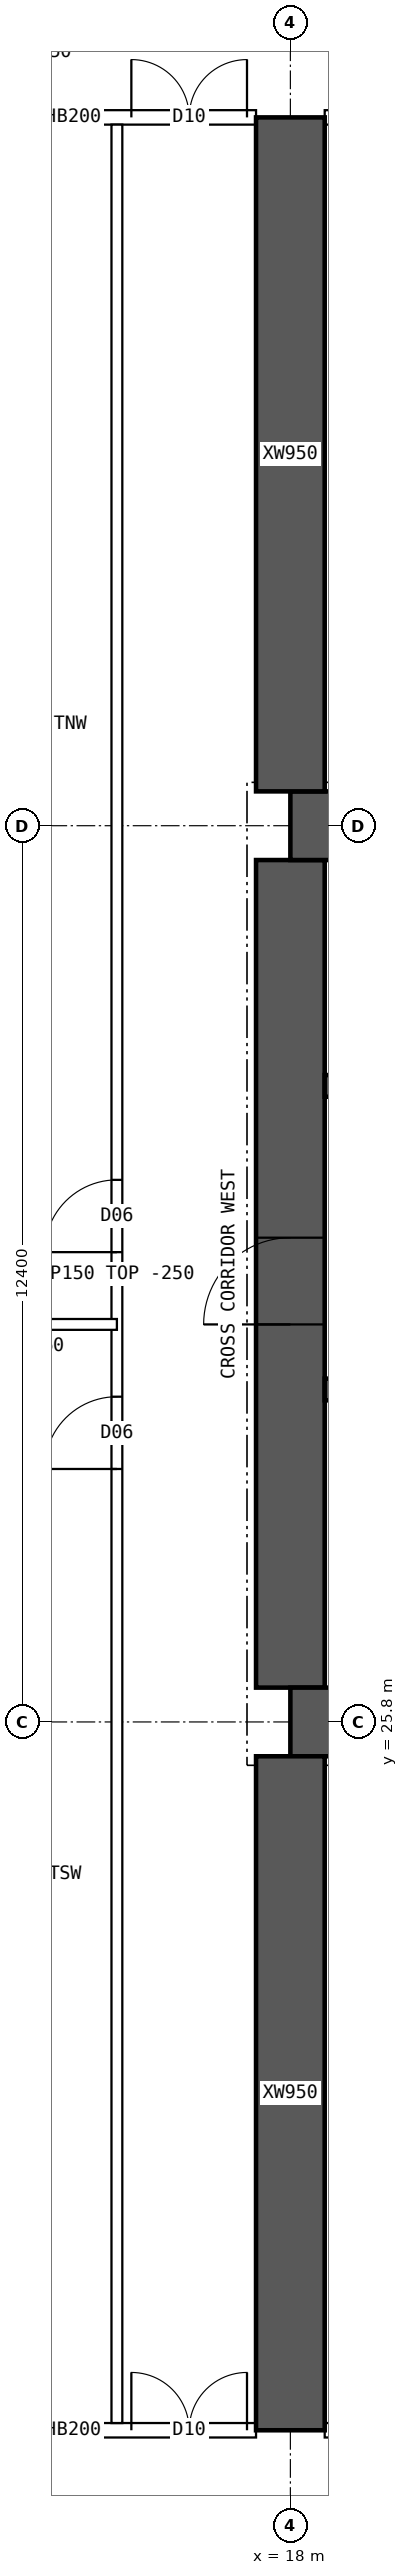
"""IFC4 building model, lengths in metres.
Left out: names, types, materials, properties, quantities, classifications, styles, units other than length and angle.
Written with IfcOpenShell. Run it as: python <this file> out.ifc"""

import sys

from ifc_helpers import new_model, si_unit, direction, frame, frame_2d, origin, place, context, subcontext, project, spatial, rectangle, extrude, element, fill, save


model = new_model("IFC4")
c1 = context("Model", 3, precision=1e-05, world=origin(), true_north=direction((0.0, 1.0)))
c2 = subcontext(c1, "Body", "Model", "MODEL_VIEW")
j1 = project(units=[si_unit("LENGTHUNIT", "METRE"), si_unit("PLANEANGLEUNIT", "RADIAN")], contexts=[c1])
p1 = place(None, origin())
s1 = spatial("IfcSite", under=j1, at=p1, CompositionType="ELEMENT")
p2 = place(p1, origin())
s2 = spatial("IfcBuilding", under=s1, at=p2, CompositionType="ELEMENT")
p3 = place(p2, frame((0.0, 0.0, 76.15)))
s3 = spatial("IfcBuildingStorey", under=s2, at=p3, CompositionType="ELEMENT", Elevation=76.15)
for number, where, z_axis, x_axis in (
    (1, (18.0, 25.8, 0.0), (0.0, 0.0, 1.0), (1.0, 0.0, 0.0)),
    (2, (18.0, 38.2, 0.0), (0.0, 0.0, 1.0), (1.0, 0.0, 0.0)),
):
    element("IfcWall", number, at=place(p3, frame(where, z_axis=z_axis, x_axis=x_axis)), inside=s3, PredefinedType="SHEAR", context=c2, shape_type="SweptSolid", body=[
        extrude(rectangle(XDim=48.0, YDim=0.95, at=frame_2d((24.0, 0.0))), origin(), (0.0, 0.0, 1.0), 4.5),
    ])
p4 = place(p3, frame((18.0, 26.275, 0.0), z_axis=(0.0, 0.0, 1.0), x_axis=(0.0, 1.0, 0.0)))
e3 = element("IfcWall", 3, at=p4, inside=s3, PredefinedType="SHEAR", context=c2, shape_type="SweptSolid", body=[
    extrude(rectangle(XDim=11.45, YDim=0.95, at=frame_2d((5.725, 0.0))), origin(), (0.0, 0.0, 1.0), 4.5),
])
p5 = place(p4, frame((5.025, 0.0, 0.0)))
e4 = element("IfcOpeningElement", 4, at=p5, cuts=e3, PredefinedType="OPENING", context=c2, shape_type="SweptSolid", body=[
    extrude(rectangle(XDim=1.2, YDim=2.1, at=frame_2d((0.6, 1.05))), frame((0.0, 0.485, 0.0), z_axis=(0.0, -1.0, 0.0), x_axis=(1.0, 0.0, 0.0)), (0.0, 0.0, 1.0), 0.97),
])
p6 = place(p3, frame((18.475, 30.4, 0.0), z_axis=(0.0, 0.0, 1.0), x_axis=(1.0, 0.0, 0.0)))
e5 = element("IfcWall", 5, at=p6, inside=s3, PredefinedType="SHEAR", context=c2, shape_type="SweptSolid", body=[
    extrude(rectangle(XDim=47.05, YDim=0.3, at=frame_2d((23.525, 0.0))), origin(), (0.0, 0.0, 1.0), 4.5),
])
p7 = place(p6, frame((0.4, 0.0, 0.0)))
e6 = element("IfcOpeningElement", 6, at=p7, cuts=e5, PredefinedType="OPENING", context=c2, shape_type="SweptSolid", body=[
    extrude(rectangle(XDim=1.0, YDim=2.1, at=frame_2d((0.5, 1.05))), frame((0.0, 0.16, 0.0), z_axis=(0.0, -1.0, 0.0), x_axis=(1.0, 0.0, 0.0)), (0.0, 0.0, 1.0), 0.32),
])
p8 = place(p6, frame((45.65, 0.0, 0.0)))
e7 = element("IfcOpeningElement", 7, at=p8, cuts=e5, PredefinedType="OPENING", context=c2, shape_type="SweptSolid", body=[
    extrude(rectangle(XDim=1.0, YDim=2.1, at=frame_2d((0.5, 1.05))), frame((0.0, 0.16, 0.0), z_axis=(0.0, -1.0, 0.0), x_axis=(1.0, 0.0, 0.0)), (0.0, 0.0, 1.0), 0.32),
])
p9 = place(p6, frame((8.275, 0.0, 0.0)))
e8 = element("IfcOpeningElement", 8, at=p9, cuts=e5, PredefinedType="OPENING", context=c2, shape_type="SweptSolid", body=[
    extrude(rectangle(XDim=1.1, YDim=2.1, at=frame_2d((0.55, 1.05))), frame((0.0, 0.16, 0.0), z_axis=(0.0, -1.0, 0.0), x_axis=(1.0, 0.0, 0.0)), (0.0, 0.0, 1.0), 0.32),
])
p10 = place(p6, frame((10.875, 0.0, 0.0)))
e9 = element("IfcOpeningElement", 9, at=p10, cuts=e5, PredefinedType="OPENING", context=c2, shape_type="SweptSolid", body=[
    extrude(rectangle(XDim=1.1, YDim=2.1, at=frame_2d((0.55, 1.05))), frame((0.0, 0.16, 0.0), z_axis=(0.0, -1.0, 0.0), x_axis=(1.0, 0.0, 0.0)), (0.0, 0.0, 1.0), 0.32),
])
p11 = place(p6, frame((13.475, 0.0, 0.0)))
e10 = element("IfcOpeningElement", 10, at=p11, cuts=e5, PredefinedType="OPENING", context=c2, shape_type="SweptSolid", body=[
    extrude(rectangle(XDim=1.1, YDim=2.1, at=frame_2d((0.55, 1.05))), frame((0.0, 0.16, 0.0), z_axis=(0.0, -1.0, 0.0), x_axis=(1.0, 0.0, 0.0)), (0.0, 0.0, 1.0), 0.32),
])
p12 = place(p6, frame((16.075, 0.0, 0.0)))
e11 = element("IfcOpeningElement", 11, at=p12, cuts=e5, PredefinedType="OPENING", context=c2, shape_type="SweptSolid", body=[
    extrude(rectangle(XDim=1.1, YDim=2.1, at=frame_2d((0.55, 1.05))), frame((0.0, 0.16, 0.0), z_axis=(0.0, -1.0, 0.0), x_axis=(1.0, 0.0, 0.0)), (0.0, 0.0, 1.0), 0.32),
])
p13 = place(p6, frame((18.75, 0.0, 0.0)))
e12 = element("IfcOpeningElement", 12, at=p13, cuts=e5, PredefinedType="OPENING", context=c2, shape_type="SweptSolid", body=[
    extrude(rectangle(XDim=1.1, YDim=2.1, at=frame_2d((0.55, 1.05))), frame((0.0, 0.16, 0.0), z_axis=(0.0, -1.0, 0.0), x_axis=(1.0, 0.0, 0.0)), (0.0, 0.0, 1.0), 0.32),
])
p14 = place(p6, frame((30.142, 0.0, 0.0)))
e13 = element("IfcOpeningElement", 13, at=p14, cuts=e5, PredefinedType="OPENING", context=c2, shape_type="SweptSolid", body=[
    extrude(rectangle(XDim=1.1, YDim=2.1, at=frame_2d((0.55, 1.05))), frame((0.0, 0.16, 0.0), z_axis=(0.0, -1.0, 0.0), x_axis=(1.0, 0.0, 0.0)), (0.0, 0.0, 1.0), 0.32),
])
p15 = place(p6, frame((33.675, 0.0, 0.0)))
e14 = element("IfcOpeningElement", 14, at=p15, cuts=e5, PredefinedType="OPENING", context=c2, shape_type="SweptSolid", body=[
    extrude(rectangle(XDim=1.1, YDim=2.1, at=frame_2d((0.55, 1.05))), frame((0.0, 0.16, 0.0), z_axis=(0.0, -1.0, 0.0), x_axis=(1.0, 0.0, 0.0)), (0.0, 0.0, 1.0), 0.32),
])
p16 = place(p6, frame((37.208, 0.0, 0.0)))
e15 = element("IfcOpeningElement", 15, at=p16, cuts=e5, PredefinedType="OPENING", context=c2, shape_type="SweptSolid", body=[
    extrude(rectangle(XDim=1.1, YDim=2.1, at=frame_2d((0.55, 1.05))), frame((0.0, 0.16, 0.0), z_axis=(0.0, -1.0, 0.0), x_axis=(1.0, 0.0, 0.0)), (0.0, 0.0, 1.0), 0.32),
])
p17 = place(p3, frame((18.475, 34.6, 0.0), z_axis=(0.0, 0.0, 1.0), x_axis=(1.0, 0.0, 0.0)))
e16 = element("IfcWall", 16, at=p17, inside=s3, PredefinedType="SHEAR", context=c2, shape_type="SweptSolid", body=[
    extrude(rectangle(XDim=47.05, YDim=0.3, at=frame_2d((23.525, 0.0))), origin(), (0.0, 0.0, 1.0), 4.5),
])
p18 = place(p17, frame((0.9, 0.0, 0.0)))
e17 = element("IfcOpeningElement", 17, at=p18, cuts=e16, PredefinedType="OPENING", context=c2, shape_type="SweptSolid", body=[
    extrude(rectangle(XDim=1.1, YDim=2.1, at=frame_2d((0.55, 1.05))), frame((0.0, 0.16, 0.0), z_axis=(0.0, -1.0, 0.0), x_axis=(1.0, 0.0, 0.0)), (0.0, 0.0, 1.0), 0.32),
])
p19 = place(p17, frame((45.05, 0.0, 0.0)))
e18 = element("IfcOpeningElement", 18, at=p19, cuts=e16, PredefinedType="OPENING", context=c2, shape_type="SweptSolid", body=[
    extrude(rectangle(XDim=1.1, YDim=2.1, at=frame_2d((0.55, 1.05))), frame((0.0, 0.16, 0.0), z_axis=(0.0, -1.0, 0.0), x_axis=(1.0, 0.0, 0.0)), (0.0, 0.0, 1.0), 0.32),
])
p20 = place(p17, frame((4.125, 0.0, 0.0)))
e19 = element("IfcOpeningElement", 19, at=p20, cuts=e16, PredefinedType="OPENING", context=c2, shape_type="SweptSolid", body=[
    extrude(rectangle(XDim=0.9, YDim=2.1, at=frame_2d((0.45, 1.05))), frame((0.0, 0.16, 0.0), z_axis=(0.0, -1.0, 0.0), x_axis=(1.0, 0.0, 0.0)), (0.0, 0.0, 1.0), 0.32),
])
p21 = place(p17, frame((42.025, 0.0, 0.0)))
e20 = element("IfcOpeningElement", 20, at=p21, cuts=e16, PredefinedType="OPENING", context=c2, shape_type="SweptSolid", body=[
    extrude(rectangle(XDim=0.9, YDim=2.1, at=frame_2d((0.45, 1.05))), frame((0.0, 0.16, 0.0), z_axis=(0.0, -1.0, 0.0), x_axis=(1.0, 0.0, 0.0)), (0.0, 0.0, 1.0), 0.32),
])
p22 = place(p17, frame((8.9, 0.0, 0.0)))
e21 = element("IfcOpeningElement", 21, at=p22, cuts=e16, PredefinedType="OPENING", context=c2, shape_type="SweptSolid", body=[
    extrude(rectangle(XDim=0.9, YDim=2.1, at=frame_2d((0.45, 1.05))), frame((0.0, 0.16, 0.0), z_axis=(0.0, -1.0, 0.0), x_axis=(1.0, 0.0, 0.0)), (0.0, 0.0, 1.0), 0.32),
])
p23 = place(p17, frame((12.874, 0.0, 0.0)))
e22 = element("IfcOpeningElement", 22, at=p23, cuts=e16, PredefinedType="OPENING", context=c2, shape_type="SweptSolid", body=[
    extrude(rectangle(XDim=0.9, YDim=2.1, at=frame_2d((0.45, 1.05))), frame((0.0, 0.16, 0.0), z_axis=(0.0, -1.0, 0.0), x_axis=(1.0, 0.0, 0.0)), (0.0, 0.0, 1.0), 0.32),
])
p24 = place(p17, frame((16.521, 0.0, 0.0)))
e23 = element("IfcOpeningElement", 23, at=p24, cuts=e16, PredefinedType="OPENING", context=c2, shape_type="SweptSolid", body=[
    extrude(rectangle(XDim=0.9, YDim=2.1, at=frame_2d((0.45, 1.05))), frame((0.0, 0.16, 0.0), z_axis=(0.0, -1.0, 0.0), x_axis=(1.0, 0.0, 0.0)), (0.0, 0.0, 1.0), 0.32),
])
p25 = place(p17, frame((20.28, 0.0, 0.0)))
e24 = element("IfcOpeningElement", 24, at=p25, cuts=e16, PredefinedType="OPENING", context=c2, shape_type="SweptSolid", body=[
    extrude(rectangle(XDim=0.9, YDim=2.1, at=frame_2d((0.45, 1.05))), frame((0.0, 0.16, 0.0), z_axis=(0.0, -1.0, 0.0), x_axis=(1.0, 0.0, 0.0)), (0.0, 0.0, 1.0), 0.32),
])
p26 = place(p17, frame((24.686, 0.0, 0.0)))
e25 = element("IfcOpeningElement", 25, at=p26, cuts=e16, PredefinedType="OPENING", context=c2, shape_type="SweptSolid", body=[
    extrude(rectangle(XDim=0.9, YDim=2.1, at=frame_2d((0.45, 1.05))), frame((0.0, 0.16, 0.0), z_axis=(0.0, -1.0, 0.0), x_axis=(1.0, 0.0, 0.0)), (0.0, 0.0, 1.0), 0.32),
])
p27 = place(p17, frame((27.483, 0.0, 0.0)))
e26 = element("IfcOpeningElement", 26, at=p27, cuts=e16, PredefinedType="OPENING", context=c2, shape_type="SweptSolid", body=[
    extrude(rectangle(XDim=0.9, YDim=2.1, at=frame_2d((0.45, 1.05))), frame((0.0, 0.16, 0.0), z_axis=(0.0, -1.0, 0.0), x_axis=(1.0, 0.0, 0.0)), (0.0, 0.0, 1.0), 0.32),
])
p28 = place(p17, frame((29.45, 0.0, 0.0)))
e27 = element("IfcOpeningElement", 27, at=p28, cuts=e16, PredefinedType="OPENING", context=c2, shape_type="SweptSolid", body=[
    extrude(rectangle(XDim=0.9, YDim=2.1, at=frame_2d((0.45, 1.05))), frame((0.0, 0.16, 0.0), z_axis=(0.0, -1.0, 0.0), x_axis=(1.0, 0.0, 0.0)), (0.0, 0.0, 1.0), 0.32),
])
p29 = place(p17, frame((31.882, 0.0, 0.0)))
e28 = element("IfcOpeningElement", 28, at=p29, cuts=e16, PredefinedType="OPENING", context=c2, shape_type="SweptSolid", body=[
    extrude(rectangle(XDim=0.9, YDim=2.1, at=frame_2d((0.45, 1.05))), frame((0.0, 0.16, 0.0), z_axis=(0.0, -1.0, 0.0), x_axis=(1.0, 0.0, 0.0)), (0.0, 0.0, 1.0), 0.32),
])
p30 = place(p17, frame((34.617, 0.0, 0.0)))
e29 = element("IfcOpeningElement", 29, at=p30, cuts=e16, PredefinedType="OPENING", context=c2, shape_type="SweptSolid", body=[
    extrude(rectangle(XDim=0.9, YDim=2.1, at=frame_2d((0.45, 1.05))), frame((0.0, 0.16, 0.0), z_axis=(0.0, -1.0, 0.0), x_axis=(1.0, 0.0, 0.0)), (0.0, 0.0, 1.0), 0.32),
])
p31 = place(p17, frame((37.656, 0.0, 0.0)))
e30 = element("IfcOpeningElement", 30, at=p31, cuts=e16, PredefinedType="OPENING", context=c2, shape_type="SweptSolid", body=[
    extrude(rectangle(XDim=0.9, YDim=2.1, at=frame_2d((0.45, 1.05))), frame((0.0, 0.16, 0.0), z_axis=(0.0, -1.0, 0.0), x_axis=(1.0, 0.0, 0.0)), (0.0, 0.0, 1.0), 0.32),
])
for number, where, z_axis, x_axis in (
    (31, (18.0, 16.0, 0.0), (0.0, 0.0, 1.0), (0.0, 1.0, 0.0)),
    (32, (18.0, 38.675, 0.0), (0.0, 0.0, 1.0), (0.0, 1.0, 0.0)),
):
    element("IfcWall", number, at=place(p3, frame(where, z_axis=z_axis, x_axis=x_axis)), inside=s3, PredefinedType="SHEAR", context=c2, shape_type="SweptSolid", body=[
        extrude(rectangle(XDim=9.325, YDim=0.95, at=frame_2d((4.663, 0.0))), origin(), (0.0, 0.0, 1.0), 4.5),
    ])
p32 = place(p3, frame((12.475, 16.0, 0.0), z_axis=(0.0, 0.0, 1.0), x_axis=(1.0, 0.0, 0.0)))
e33 = element("IfcWall", 33, at=p32, inside=s3, PredefinedType="SOLIDWALL", context=c2, shape_type="SweptSolid", body=[
    extrude(rectangle(XDim=5.05, YDim=0.2, at=frame_2d((2.525, 0.0))), origin(), (0.0, 0.0, 1.0), 4.25),
])
p33 = place(p32, frame((3.325, 0.0, 0.0)))
e34 = element("IfcOpeningElement", 34, at=p33, cuts=e33, PredefinedType="OPENING", context=c2, shape_type="SweptSolid", body=[
    extrude(rectangle(XDim=1.6, YDim=2.1, at=frame_2d((0.8, 1.05))), frame((0.0, 0.11, 0.0), z_axis=(0.0, -1.0, 0.0), x_axis=(1.0, 0.0, 0.0)), (0.0, 0.0, 1.0), 0.22),
])
p34 = place(p3, frame((18.475, 16.0, 0.0), z_axis=(0.0, 0.0, 1.0), x_axis=(1.0, 0.0, 0.0)))
e35 = element("IfcWall", 35, at=p34, inside=s3, PredefinedType="SOLIDWALL", context=c2, shape_type="SweptSolid", body=[
    extrude(rectangle(XDim=5.05, YDim=0.2, at=frame_2d((2.525, 0.0))), origin(), (0.0, 0.0, 1.0), 4.25),
])
p35 = place(p34, frame((0.35, 0.0, 0.0)))
e36 = element("IfcOpeningElement", 36, at=p35, cuts=e35, PredefinedType="OPENING", context=c2, shape_type="SweptSolid", body=[
    extrude(rectangle(XDim=0.9, YDim=2.1, at=frame_2d((0.45, 1.05))), frame((0.0, 0.11, 0.0), z_axis=(0.0, -1.0, 0.0), x_axis=(1.0, 0.0, 0.0)), (0.0, 0.0, 1.0), 0.22),
])
p36 = place(p34, frame((3.195, 0.0, 0.0)))
e37 = element("IfcOpeningElement", 37, at=p36, cuts=e35, PredefinedType="OPENING", context=c2, shape_type="SweptSolid", body=[
    extrude(rectangle(XDim=0.9, YDim=2.1, at=frame_2d((0.45, 1.05))), frame((0.0, 0.11, 0.0), z_axis=(0.0, -1.0, 0.0), x_axis=(1.0, 0.0, 0.0)), (0.0, 0.0, 1.0), 0.22),
])
p37 = place(p3, frame((12.475, 48.0, 0.0), z_axis=(0.0, 0.0, 1.0), x_axis=(1.0, 0.0, 0.0)))
e38 = element("IfcWall", 38, at=p37, inside=s3, PredefinedType="SOLIDWALL", context=c2, shape_type="SweptSolid", body=[
    extrude(rectangle(XDim=5.05, YDim=0.2, at=frame_2d((2.525, 0.0))), origin(), (0.0, 0.0, 1.0), 4.25),
])
p38 = place(p37, frame((3.325, 0.0, 0.0)))
e39 = element("IfcOpeningElement", 39, at=p38, cuts=e38, PredefinedType="OPENING", context=c2, shape_type="SweptSolid", body=[
    extrude(rectangle(XDim=1.6, YDim=2.1, at=frame_2d((0.8, 1.05))), frame((0.0, 0.11, 0.0), z_axis=(0.0, -1.0, 0.0), x_axis=(1.0, 0.0, 0.0)), (0.0, 0.0, 1.0), 0.22),
])
p39 = place(p3, frame((18.475, 48.0, 0.0), z_axis=(0.0, 0.0, 1.0), x_axis=(1.0, 0.0, 0.0)))
e40 = element("IfcWall", 40, at=p39, inside=s3, PredefinedType="SOLIDWALL", context=c2, shape_type="SweptSolid", body=[
    extrude(rectangle(XDim=5.05, YDim=0.2, at=frame_2d((2.525, 0.0))), origin(), (0.0, 0.0, 1.0), 4.25),
])
p40 = place(p39, frame((0.35, 0.0, 0.0)))
e41 = element("IfcOpeningElement", 41, at=p40, cuts=e40, PredefinedType="OPENING", context=c2, shape_type="SweptSolid", body=[
    extrude(rectangle(XDim=0.9, YDim=2.1, at=frame_2d((0.45, 1.05))), frame((0.0, 0.11, 0.0), z_axis=(0.0, -1.0, 0.0), x_axis=(1.0, 0.0, 0.0)), (0.0, 0.0, 1.0), 0.22),
])
p41 = place(p39, frame((3.745, 0.0, 0.0)))
e42 = element("IfcOpeningElement", 42, at=p41, cuts=e40, PredefinedType="OPENING", context=c2, shape_type="SweptSolid", body=[
    extrude(rectangle(XDim=0.9, YDim=2.1, at=frame_2d((0.45, 1.05))), frame((0.0, 0.11, 0.0), z_axis=(0.0, -1.0, 0.0), x_axis=(1.0, 0.0, 0.0)), (0.0, 0.0, 1.0), 0.22),
])
p42 = place(p3, frame((15.6, 16.1, 0.0), z_axis=(0.0, 0.0, 1.0), x_axis=(0.0, 1.0, 0.0)))
e43 = element("IfcWall", 43, at=p42, inside=s3, PredefinedType="PARTITIONING", context=c2, shape_type="SweptSolid", body=[
    extrude(rectangle(XDim=31.8, YDim=0.15, at=frame_2d((15.9, 0.0))), origin(), (0.0, 0.0, 1.0), 4.25),
])
p43 = place(p42, frame((13.2, 0.0, 0.0)))
e44 = element("IfcOpeningElement", 44, at=p43, cuts=e43, PredefinedType="OPENING", context=c2, shape_type="SweptSolid", body=[
    extrude(rectangle(XDim=1.0, YDim=2.1, at=frame_2d((0.5, 1.05))), frame((0.0, 0.085, 0.0), z_axis=(0.0, -1.0, 0.0), x_axis=(1.0, 0.0, 0.0)), (0.0, 0.0, 1.0), 0.17),
])
p44 = place(p42, frame((16.2, 0.0, 0.0)))
e45 = element("IfcOpeningElement", 45, at=p44, cuts=e43, PredefinedType="OPENING", context=c2, shape_type="SweptSolid", body=[
    extrude(rectangle(XDim=1.0, YDim=2.1, at=frame_2d((0.5, 1.05))), frame((0.0, 0.085, 0.0), z_axis=(0.0, -1.0, 0.0), x_axis=(1.0, 0.0, 0.0)), (0.0, 0.0, 1.0), 0.17),
])
p45 = place(p3, frame((12.0, 31.3, 0.0), z_axis=(0.0, 0.0, 1.0), x_axis=(1.0, 0.0, 0.0)))
e46 = element("IfcWall", 46, at=p45, inside=s3, PredefinedType="PARTITIONING", context=c2, shape_type="SweptSolid", body=[
    extrude(rectangle(XDim=3.6, YDim=0.15, at=frame_2d((1.8, 0.0))), origin(), (0.0, 0.0, 1.0), 4.25),
])
p46 = place(p5, origin())
e47 = element("IfcDoor", 47, at=p46, inside=s3, OperationType="SINGLE_SWING_LEFT", PredefinedType="DOOR", context=c2, shape_type="SweptSolid", body=[
    extrude(rectangle(XDim=1.2, YDim=2.1, at=frame_2d((0.6, 1.05))), frame((0.0, 0.025, 0.0), z_axis=(0.0, -1.0, 0.0), x_axis=(1.0, 0.0, 0.0)), (0.0, 0.0, 1.0), 0.05),
])
fill(e4, e47)
p47 = place(p33, origin())
e48 = element("IfcDoor", 48, at=p47, inside=s3, OperationType="DOUBLE_DOOR_SINGLE_SWING", PredefinedType="DOOR", context=c2, shape_type="SweptSolid", body=[
    extrude(rectangle(XDim=1.6, YDim=2.1, at=frame_2d((0.8, 1.05))), frame((0.0, 0.025, 0.0), z_axis=(0.0, -1.0, 0.0), x_axis=(1.0, 0.0, 0.0)), (0.0, 0.0, 1.0), 0.05),
])
fill(e34, e48)
p48 = place(p38, origin())
e49 = element("IfcDoor", 49, at=p48, inside=s3, OperationType="DOUBLE_DOOR_SINGLE_SWING", PredefinedType="DOOR", context=c2, shape_type="SweptSolid", body=[
    extrude(rectangle(XDim=1.6, YDim=2.1, at=frame_2d((0.8, 1.05))), frame((0.0, 0.025, 0.0), z_axis=(0.0, -1.0, 0.0), x_axis=(1.0, 0.0, 0.0)), (0.0, 0.0, 1.0), 0.05),
])
fill(e39, e49)
p49 = place(p43, origin())
e50 = element("IfcDoor", 50, at=p49, inside=s3, OperationType="SINGLE_SWING_LEFT", PredefinedType="DOOR", context=c2, shape_type="SweptSolid", body=[
    extrude(rectangle(XDim=1.0, YDim=2.1, at=frame_2d((0.5, 1.05))), frame((0.0, 0.025, 0.0), z_axis=(0.0, -1.0, 0.0), x_axis=(1.0, 0.0, 0.0)), (0.0, 0.0, 1.0), 0.05),
])
fill(e44, e50)
p50 = place(p44, origin())
e51 = element("IfcDoor", 51, at=p50, inside=s3, OperationType="SINGLE_SWING_LEFT", PredefinedType="DOOR", context=c2, shape_type="SweptSolid", body=[
    extrude(rectangle(XDim=1.0, YDim=2.1, at=frame_2d((0.5, 1.05))), frame((0.0, 0.025, 0.0), z_axis=(0.0, -1.0, 0.0), x_axis=(1.0, 0.0, 0.0)), (0.0, 0.0, 1.0), 0.05),
])
fill(e45, e51)
save(model, sys.argv[1])
